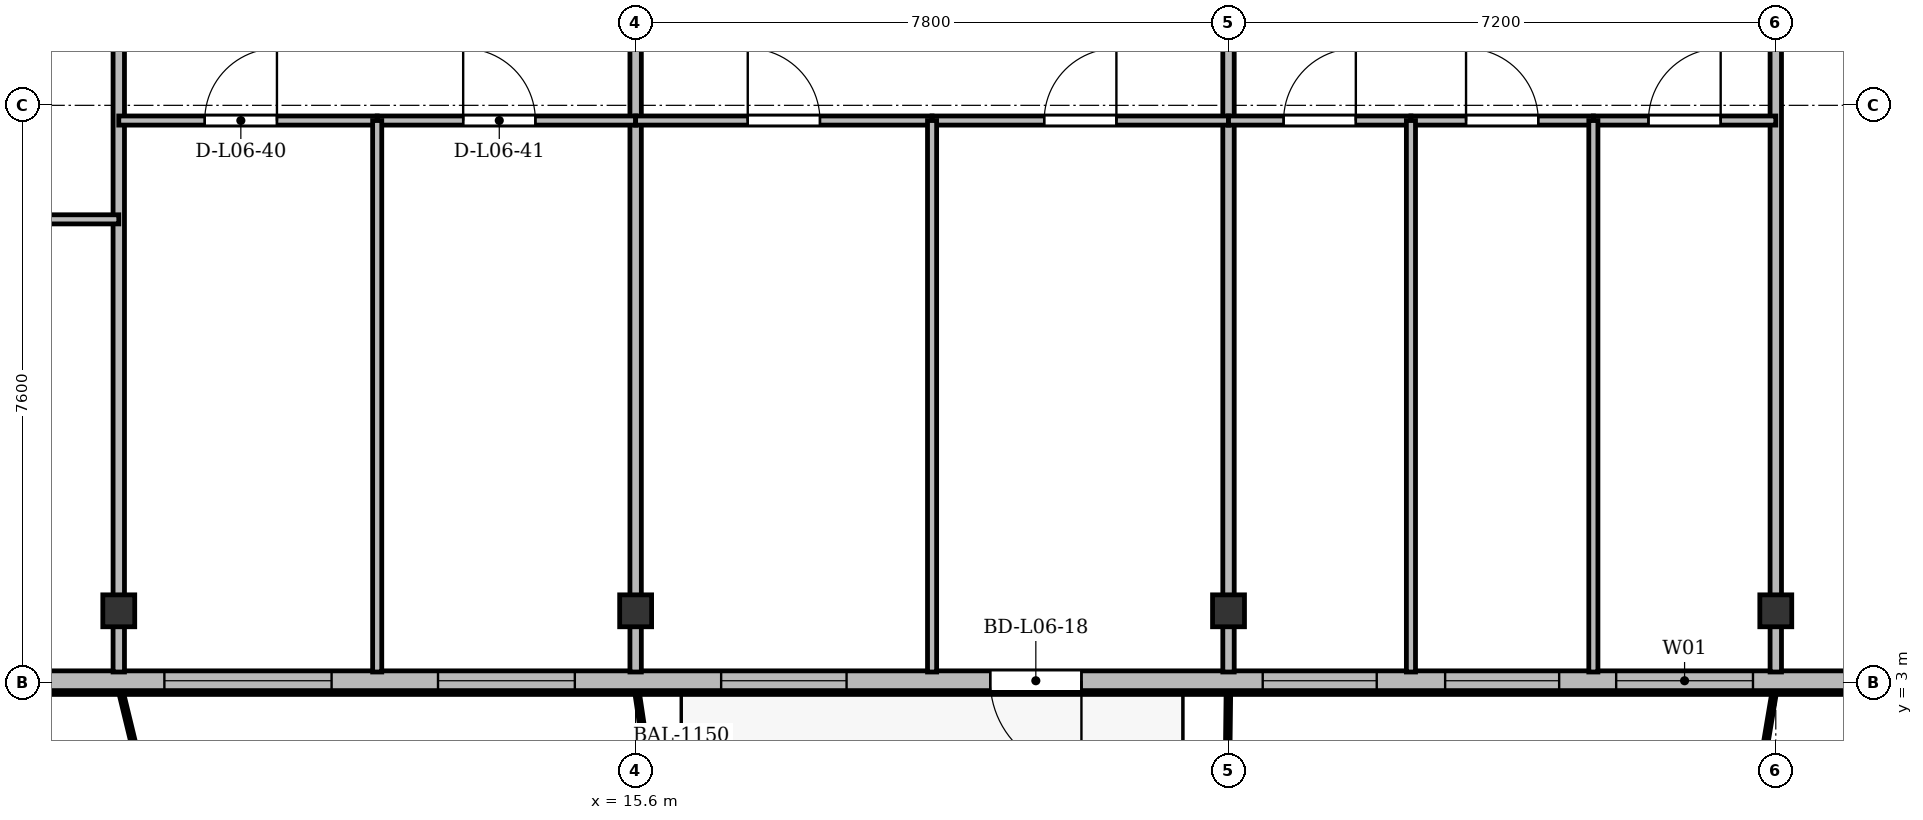
"""IFC4 building model, lengths in metres.
Left out: names, types, materials, properties, quantities, classifications, styles, units other than length and angle.
Written with IfcOpenShell. Run it as: python <this file> out.ifc"""

import sys

from ifc_helpers import new_model, si_unit, direction, frame, frame_2d, origin, origin_2d, place, context, subcontext, project, spatial, rectangle, i_section, extrude, source, transform, mapped, element, fill, save


model = new_model("IFC4")
c1 = context("Model", 3, precision=1e-05, world=origin(), true_north=direction((0.0, 1.0)))
c2 = subcontext(c1, "Body", "Model", "MODEL_VIEW")
j1 = project(units=[si_unit("LENGTHUNIT", "METRE"), si_unit("PLANEANGLEUNIT", "RADIAN")], contexts=[c1])
p1 = place(None, origin())
s1 = spatial("IfcSite", under=j1, at=p1, CompositionType="ELEMENT")
p2 = place(p1, origin())
s2 = spatial("IfcBuilding", under=s1, at=p2, CompositionType="ELEMENT")
p3 = place(p2, frame((0.0, 0.0, 27.1)))
s3 = spatial("IfcBuildingStorey", under=s2, at=p3, CompositionType="ELEMENT", Elevation=27.1)
m1 = source(origin(), c2, "Body", "SweptSolid", [
    extrude(i_section(OverallWidth=0.42, OverallDepth=0.42, WebThickness=0.026, FlangeThickness=0.04, at=origin_2d()), origin(), (0.0, 0.0, 1.0), 3.6),
])
for number, where, z_axis, x_axis in (
    (1, (8.8, 3.95, 0.0), (0.0, 0.0, 1.0), (1.0, 0.0, 0.0)),
    (2, (15.6, 3.95, 0.0), (0.0, 0.0, 1.0), (1.0, 0.0, 0.0)),
    (3, (23.4, 3.95, 0.0), (0.0, 0.0, 1.0), (1.0, 0.0, 0.0)),
    (4, (30.6, 3.95, 0.0), (0.0, 0.0, 1.0), (1.0, 0.0, 0.0)),
):
    element("IfcColumn", number, at=place(p3, frame(where, z_axis=z_axis, x_axis=x_axis)), inside=s3, PredefinedType="COLUMN", context=c2, shape_type="MappedRepresentation", body=[
        mapped(m1, transform((0.0, 0.0, 0.0), x_axis=(1.0, 0.0, 0.0), y_axis=(0.0, 1.0, 0.0), z_axis=(0.0, 0.0, 1.0), scale=1.0)),
    ])
p4 = place(p3, frame((66.9, 3.03, 0.0), z_axis=(0.0, 0.0, 1.0), x_axis=(-1.0, 0.0, 0.0)))
e5 = element("IfcWall", 5, at=p4, inside=s3, PredefinedType="SOLIDWALL", context=c2, shape_type="SweptSolid", body=[
    extrude(rectangle(XDim=59.4, YDim=0.26, at=frame_2d((29.7, 0.0))), origin(), (0.0, 0.0, 1.0), 3.34),
])
p5 = place(p4, frame((3.95, 0.0, 0.9)))
e6 = element("IfcOpeningElement", 6, at=p5, cuts=e5, PredefinedType="OPENING", context=c2, shape_type="SweptSolid", body=[
    extrude(rectangle(XDim=1.5, YDim=1.75, at=frame_2d((0.75, 0.875))), frame((0.0, 0.14, 0.0), z_axis=(0.0, -1.0, 0.0), x_axis=(1.0, 0.0, 0.0)), (0.0, 0.0, 1.0), 0.28),
])
p6 = place(p4, frame((9.05, 0.0, 0.9)))
e7 = element("IfcOpeningElement", 7, at=p6, cuts=e5, PredefinedType="OPENING", context=c2, shape_type="SweptSolid", body=[
    extrude(rectangle(XDim=2.0, YDim=1.95, at=frame_2d((1.0, 0.975))), frame((0.0, 0.14, 0.0), z_axis=(0.0, -1.0, 0.0), x_axis=(1.0, 0.0, 0.0)), (0.0, 0.0, 1.0), 0.28),
])
p7 = place(p4, frame((13.125, 0.0, 0.9)))
e8 = element("IfcOpeningElement", 8, at=p7, cuts=e5, PredefinedType="OPENING", context=c2, shape_type="SweptSolid", body=[
    extrude(rectangle(XDim=1.65, YDim=1.85, at=frame_2d((0.825, 0.925))), frame((0.0, 0.14, 0.0), z_axis=(0.0, -1.0, 0.0), x_axis=(1.0, 0.0, 0.0)), (0.0, 0.0, 1.0), 0.28),
])
p8 = place(p4, frame((17.007, 0.0, 0.0)))
e9 = element("IfcOpeningElement", 9, at=p8, cuts=e5, PredefinedType="OPENING", context=c2, shape_type="SweptSolid", body=[
    extrude(rectangle(XDim=1.2, YDim=2.2, at=frame_2d((0.6, 1.1))), frame((0.0, 0.14, 0.0), z_axis=(0.0, -1.0, 0.0), x_axis=(1.0, 0.0, 0.0)), (0.0, 0.0, 1.0), 0.28),
])
p9 = place(p4, frame((20.2, 0.0, 0.9)))
e10 = element("IfcOpeningElement", 10, at=p9, cuts=e5, PredefinedType="OPENING", context=c2, shape_type="SweptSolid", body=[
    extrude(rectangle(XDim=2.2, YDim=1.8, at=frame_2d((1.1, 0.9))), frame((0.0, 0.14, 0.0), z_axis=(0.0, -1.0, 0.0), x_axis=(1.0, 0.0, 0.0)), (0.0, 0.0, 1.0), 0.28),
])
p10 = place(p4, frame((24.0, 0.0, 0.9)))
e11 = element("IfcOpeningElement", 11, at=p10, cuts=e5, PredefinedType="OPENING", context=c2, shape_type="SweptSolid", body=[
    extrude(rectangle(XDim=1.5, YDim=1.75, at=frame_2d((0.75, 0.875))), frame((0.0, 0.14, 0.0), z_axis=(0.0, -1.0, 0.0), x_axis=(1.0, 0.0, 0.0)), (0.0, 0.0, 1.0), 0.28),
])
p11 = place(p4, frame((27.05, 0.0, 0.9)))
e12 = element("IfcOpeningElement", 12, at=p11, cuts=e5, PredefinedType="OPENING", context=c2, shape_type="SweptSolid", body=[
    extrude(rectangle(XDim=2.0, YDim=1.95, at=frame_2d((1.0, 0.975))), frame((0.0, 0.14, 0.0), z_axis=(0.0, -1.0, 0.0), x_axis=(1.0, 0.0, 0.0)), (0.0, 0.0, 1.0), 0.28),
])
p12 = place(p4, frame((32.175, 0.0, 0.9)))
e13 = element("IfcOpeningElement", 13, at=p12, cuts=e5, PredefinedType="OPENING", context=c2, shape_type="SweptSolid", body=[
    extrude(rectangle(XDim=1.65, YDim=1.85, at=frame_2d((0.825, 0.925))), frame((0.0, 0.14, 0.0), z_axis=(0.0, -1.0, 0.0), x_axis=(1.0, 0.0, 0.0)), (0.0, 0.0, 1.0), 0.28),
])
p13 = place(p4, frame((36.6, 0.0, 0.9)))
e14 = element("IfcOpeningElement", 14, at=p13, cuts=e5, PredefinedType="OPENING", context=c2, shape_type="SweptSolid", body=[
    extrude(rectangle(XDim=1.8, YDim=1.8, at=frame_2d((0.9, 0.9))), frame((0.0, 0.14, 0.0), z_axis=(0.0, -1.0, 0.0), x_axis=(1.0, 0.0, 0.0)), (0.0, 0.0, 1.0), 0.28),
])
p14 = place(p4, frame((39.15, 0.0, 0.9)))
e15 = element("IfcOpeningElement", 15, at=p14, cuts=e5, PredefinedType="OPENING", context=c2, shape_type="SweptSolid", body=[
    extrude(rectangle(XDim=1.5, YDim=1.75, at=frame_2d((0.75, 0.875))), frame((0.0, 0.14, 0.0), z_axis=(0.0, -1.0, 0.0), x_axis=(1.0, 0.0, 0.0)), (0.0, 0.0, 1.0), 0.28),
])
p15 = place(p4, frame((41.55, 0.0, 0.9)))
e16 = element("IfcOpeningElement", 16, at=p15, cuts=e5, PredefinedType="OPENING", context=c2, shape_type="SweptSolid", body=[
    extrude(rectangle(XDim=1.5, YDim=1.75, at=frame_2d((0.75, 0.875))), frame((0.0, 0.14, 0.0), z_axis=(0.0, -1.0, 0.0), x_axis=(1.0, 0.0, 0.0)), (0.0, 0.0, 1.0), 0.28),
])
p16 = place(p4, frame((45.435, 0.0, 0.0)))
e17 = element("IfcOpeningElement", 17, at=p16, cuts=e5, PredefinedType="OPENING", context=c2, shape_type="SweptSolid", body=[
    extrude(rectangle(XDim=1.2, YDim=2.2, at=frame_2d((0.6, 1.1))), frame((0.0, 0.14, 0.0), z_axis=(0.0, -1.0, 0.0), x_axis=(1.0, 0.0, 0.0)), (0.0, 0.0, 1.0), 0.28),
])
p17 = place(p4, frame((48.525, 0.0, 0.9)))
e18 = element("IfcOpeningElement", 18, at=p17, cuts=e5, PredefinedType="OPENING", context=c2, shape_type="SweptSolid", body=[
    extrude(rectangle(XDim=1.65, YDim=1.85, at=frame_2d((0.825, 0.925))), frame((0.0, 0.14, 0.0), z_axis=(0.0, -1.0, 0.0), x_axis=(1.0, 0.0, 0.0)), (0.0, 0.0, 1.0), 0.28),
])
p18 = place(p4, frame((52.1, 0.0, 0.9)))
e19 = element("IfcOpeningElement", 19, at=p18, cuts=e5, PredefinedType="OPENING", context=c2, shape_type="SweptSolid", body=[
    extrude(rectangle(XDim=1.8, YDim=1.8, at=frame_2d((0.9, 0.9))), frame((0.0, 0.14, 0.0), z_axis=(0.0, -1.0, 0.0), x_axis=(1.0, 0.0, 0.0)), (0.0, 0.0, 1.0), 0.28),
])
p19 = place(p4, frame((55.3, 0.0, 0.9)))
e20 = element("IfcOpeningElement", 20, at=p19, cuts=e5, PredefinedType="OPENING", context=c2, shape_type="SweptSolid", body=[
    extrude(rectangle(XDim=2.2, YDim=1.8, at=frame_2d((1.1, 0.9))), frame((0.0, 0.14, 0.0), z_axis=(0.0, -1.0, 0.0), x_axis=(1.0, 0.0, 0.0)), (0.0, 0.0, 1.0), 0.28),
])
for number, where, z_axis, x_axis in (
    (21, (8.8, 3.145, 0.0), (0.0, 0.0, 1.0), (0.0, 1.0, 0.0)),
    (22, (15.6, 3.145, 0.0), (0.0, 0.0, 1.0), (0.0, 1.0, 0.0)),
    (23, (23.4, 3.145, 0.0), (0.0, 0.0, 1.0), (0.0, 1.0, 0.0)),
    (24, (30.6, 3.145, 0.0), (0.0, 0.0, 1.0), (0.0, 1.0, 0.0)),
):
    element("IfcWall", number, at=place(p3, frame(where, z_axis=z_axis, x_axis=x_axis)), inside=s3, PredefinedType="PARTITIONING", context=c2, shape_type="SweptSolid", body=[
        extrude(rectangle(XDim=24.455, YDim=0.15, at=frame_2d((12.228, 0.0))), origin(), (0.0, 0.0, 1.0), 2.752),
    ])
p20 = place(p3, frame((4.76, 9.1, 0.0), z_axis=(0.0, 0.0, 1.0), x_axis=(1.0, 0.0, 0.0)))
e25 = element("IfcWall", 25, at=p20, inside=s3, PredefinedType="PARTITIONING", context=c2, shape_type="SweptSolid", body=[
    extrude(rectangle(XDim=4.04, YDim=0.12, at=frame_2d((2.02, 0.0))), origin(), (0.0, 0.0, 1.0), 2.752),
])
p21 = place(p20, frame((1.545, 0.0, 0.0)))
e26 = element("IfcOpeningElement", 26, at=p21, cuts=e25, PredefinedType="OPENING", context=c2, shape_type="SweptSolid", body=[
    extrude(rectangle(XDim=0.95, YDim=2.15, at=frame_2d((0.475, 1.075))), frame((0.0, 0.07, 0.0), z_axis=(0.0, -1.0, 0.0), x_axis=(1.0, 0.0, 0.0)), (0.0, 0.0, 1.0), 0.14),
])
p22 = place(p3, frame((8.8, 10.4, 0.0), z_axis=(0.0, 0.0, 1.0), x_axis=(1.0, 0.0, 0.0)))
e27 = element("IfcWall", 27, at=p22, inside=s3, PredefinedType="PARTITIONING", context=c2, shape_type="SweptSolid", body=[
    extrude(rectangle(XDim=3.4, YDim=0.12, at=frame_2d((1.7, 0.0))), origin(), (0.0, 0.0, 1.0), 2.752),
])
p23 = place(p22, frame((1.131, 0.0, 0.0)))
e28 = element("IfcOpeningElement", 28, at=p23, cuts=e27, PredefinedType="OPENING", context=c2, shape_type="SweptSolid", body=[
    extrude(rectangle(XDim=0.95, YDim=2.15, at=frame_2d((0.475, 1.075))), frame((0.0, 0.07, 0.0), z_axis=(0.0, -1.0, 0.0), x_axis=(1.0, 0.0, 0.0)), (0.0, 0.0, 1.0), 0.14),
])
p24 = place(p3, frame((12.2, 10.4, 0.0), z_axis=(0.0, 0.0, 1.0), x_axis=(1.0, 0.0, 0.0)))
e29 = element("IfcWall", 29, at=p24, inside=s3, PredefinedType="PARTITIONING", context=c2, shape_type="SweptSolid", body=[
    extrude(rectangle(XDim=3.4, YDim=0.12, at=frame_2d((1.7, 0.0))), origin(), (0.0, 0.0, 1.0), 2.752),
])
p25 = place(p24, frame((1.131, 0.0, 0.0)))
e30 = element("IfcOpeningElement", 30, at=p25, cuts=e29, PredefinedType="OPENING", context=c2, shape_type="SweptSolid", body=[
    extrude(rectangle(XDim=0.95, YDim=2.15, at=frame_2d((0.475, 1.075))), frame((0.0, 0.07, 0.0), z_axis=(0.0, -1.0, 0.0), x_axis=(1.0, 0.0, 0.0)), (0.0, 0.0, 1.0), 0.14),
])
p26 = place(p3, frame((12.2, 3.145, 0.0), z_axis=(0.0, 0.0, 1.0), x_axis=(0.0, 1.0, 0.0)))
e31 = element("IfcWall", 31, at=p26, inside=s3, PredefinedType="PARTITIONING", context=c2, shape_type="SweptSolid", body=[
    extrude(rectangle(XDim=7.255, YDim=0.12, at=frame_2d((3.627, 0.0))), origin(), (0.0, 0.0, 1.0), 2.69),
])
p27 = place(p3, frame((15.6, 10.4, 0.0), z_axis=(0.0, 0.0, 1.0), x_axis=(1.0, 0.0, 0.0)))
e32 = element("IfcWall", 32, at=p27, inside=s3, PredefinedType="PARTITIONING", context=c2, shape_type="SweptSolid", body=[
    extrude(rectangle(XDim=3.9, YDim=0.12, at=frame_2d((1.95, 0.0))), origin(), (0.0, 0.0, 1.0), 2.752),
])
p28 = place(p27, frame((1.475, 0.0, 0.0)))
e33 = element("IfcOpeningElement", 33, at=p28, cuts=e32, PredefinedType="OPENING", context=c2, shape_type="SweptSolid", body=[
    extrude(rectangle(XDim=0.95, YDim=2.15, at=frame_2d((0.475, 1.075))), frame((0.0, 0.07, 0.0), z_axis=(0.0, -1.0, 0.0), x_axis=(1.0, 0.0, 0.0)), (0.0, 0.0, 1.0), 0.14),
])
p29 = place(p3, frame((19.5, 10.4, 0.0), z_axis=(0.0, 0.0, 1.0), x_axis=(1.0, 0.0, 0.0)))
e34 = element("IfcWall", 34, at=p29, inside=s3, PredefinedType="PARTITIONING", context=c2, shape_type="SweptSolid", body=[
    extrude(rectangle(XDim=3.9, YDim=0.12, at=frame_2d((1.95, 0.0))), origin(), (0.0, 0.0, 1.0), 2.752),
])
p30 = place(p29, frame((1.475, 0.0, 0.0)))
e35 = element("IfcOpeningElement", 35, at=p30, cuts=e34, PredefinedType="OPENING", context=c2, shape_type="SweptSolid", body=[
    extrude(rectangle(XDim=0.95, YDim=2.15, at=frame_2d((0.475, 1.075))), frame((0.0, 0.07, 0.0), z_axis=(0.0, -1.0, 0.0), x_axis=(1.0, 0.0, 0.0)), (0.0, 0.0, 1.0), 0.14),
])
p31 = place(p3, frame((19.5, 3.145, 0.0), z_axis=(0.0, 0.0, 1.0), x_axis=(0.0, 1.0, 0.0)))
e36 = element("IfcWall", 36, at=p31, inside=s3, PredefinedType="PARTITIONING", context=c2, shape_type="SweptSolid", body=[
    extrude(rectangle(XDim=7.255, YDim=0.12, at=frame_2d((3.627, 0.0))), origin(), (0.0, 0.0, 1.0), 2.69),
])
p32 = place(p3, frame((23.4, 10.4, 0.0), z_axis=(0.0, 0.0, 1.0), x_axis=(1.0, 0.0, 0.0)))
e37 = element("IfcWall", 37, at=p32, inside=s3, PredefinedType="PARTITIONING", context=c2, shape_type="SweptSolid", body=[
    extrude(rectangle(XDim=2.4, YDim=0.12, at=frame_2d((1.2, 0.0))), origin(), (0.0, 0.0, 1.0), 2.752),
])
p33 = place(p32, frame((0.725, 0.0, 0.0)))
e38 = element("IfcOpeningElement", 38, at=p33, cuts=e37, PredefinedType="OPENING", context=c2, shape_type="SweptSolid", body=[
    extrude(rectangle(XDim=0.95, YDim=2.15, at=frame_2d((0.475, 1.075))), frame((0.0, 0.07, 0.0), z_axis=(0.0, -1.0, 0.0), x_axis=(1.0, 0.0, 0.0)), (0.0, 0.0, 1.0), 0.14),
])
p34 = place(p3, frame((25.8, 10.4, 0.0), z_axis=(0.0, 0.0, 1.0), x_axis=(1.0, 0.0, 0.0)))
e39 = element("IfcWall", 39, at=p34, inside=s3, PredefinedType="PARTITIONING", context=c2, shape_type="SweptSolid", body=[
    extrude(rectangle(XDim=2.4, YDim=0.12, at=frame_2d((1.2, 0.0))), origin(), (0.0, 0.0, 1.0), 3.34),
])
p35 = place(p34, frame((0.725, 0.0, 0.0)))
e40 = element("IfcOpeningElement", 40, at=p35, cuts=e39, PredefinedType="OPENING", context=c2, shape_type="SweptSolid", body=[
    extrude(rectangle(XDim=0.95, YDim=2.15, at=frame_2d((0.475, 1.075))), frame((0.0, 0.07, 0.0), z_axis=(0.0, -1.0, 0.0), x_axis=(1.0, 0.0, 0.0)), (0.0, 0.0, 1.0), 0.14),
])
p36 = place(p3, frame((25.8, 3.145, 0.0), z_axis=(0.0, 0.0, 1.0), x_axis=(0.0, 1.0, 0.0)))
e41 = element("IfcWall", 41, at=p36, inside=s3, PredefinedType="PARTITIONING", context=c2, shape_type="SweptSolid", body=[
    extrude(rectangle(XDim=7.255, YDim=0.12, at=frame_2d((3.627, 0.0))), origin(), (0.0, 0.0, 1.0), 2.69),
])
p37 = place(p3, frame((28.2, 10.4, 0.0), z_axis=(0.0, 0.0, 1.0), x_axis=(1.0, 0.0, 0.0)))
e42 = element("IfcWall", 42, at=p37, inside=s3, PredefinedType="PARTITIONING", context=c2, shape_type="SweptSolid", body=[
    extrude(rectangle(XDim=2.4, YDim=0.12, at=frame_2d((1.2, 0.0))), origin(), (0.0, 0.0, 1.0), 2.752),
])
p38 = place(p37, frame((0.725, 0.0, 0.0)))
e43 = element("IfcOpeningElement", 43, at=p38, cuts=e42, PredefinedType="OPENING", context=c2, shape_type="SweptSolid", body=[
    extrude(rectangle(XDim=0.95, YDim=2.15, at=frame_2d((0.475, 1.075))), frame((0.0, 0.07, 0.0), z_axis=(0.0, -1.0, 0.0), x_axis=(1.0, 0.0, 0.0)), (0.0, 0.0, 1.0), 0.14),
])
p39 = place(p3, frame((28.2, 3.145, 0.0), z_axis=(0.0, 0.0, 1.0), x_axis=(0.0, 1.0, 0.0)))
e44 = element("IfcWall", 44, at=p39, inside=s3, PredefinedType="PARTITIONING", context=c2, shape_type="SweptSolid", body=[
    extrude(rectangle(XDim=7.255, YDim=0.12, at=frame_2d((3.627, 0.0))), origin(), (0.0, 0.0, 1.0), 2.69),
])
m2 = source(origin(), c2, "Body", "SweptSolid", [
    extrude(rectangle(XDim=1.8, YDim=1.8, at=frame_2d((0.9, 0.9))), frame((0.0, 0.03, 0.0), z_axis=(0.0, -1.0, 0.0), x_axis=(1.0, 0.0, 0.0)), (0.0, 0.0, 1.0), 0.06),
])
p40 = place(p13, origin())
e45 = element("IfcWindow", 45, at=p40, inside=s3, PartitioningType="SINGLE_PANEL", PredefinedType="WINDOW", context=c2, shape_type="MappedRepresentation", body=[
    mapped(m2, transform((0.0, 0.0, 0.0), x_axis=(1.0, 0.0, 0.0), y_axis=(0.0, 1.0, 0.0), z_axis=(0.0, 0.0, 1.0), scale=1.0)),
])
fill(e14, e45)
m3 = source(origin(), c2, "Body", "SweptSolid", [
    extrude(rectangle(XDim=1.5, YDim=1.75, at=frame_2d((0.75, 0.875))), frame((0.0, 0.03, 0.0), z_axis=(0.0, -1.0, 0.0), x_axis=(1.0, 0.0, 0.0)), (0.0, 0.0, 1.0), 0.06),
])
p41 = place(p14, origin())
e46 = element("IfcWindow", 46, at=p41, inside=s3, PartitioningType="SINGLE_PANEL", PredefinedType="WINDOW", context=c2, shape_type="MappedRepresentation", body=[
    mapped(m3, transform((0.0, 0.0, 0.0), x_axis=(1.0, 0.0, 0.0), y_axis=(0.0, 1.0, 0.0), z_axis=(0.0, 0.0, 1.0), scale=1.0)),
])
fill(e15, e46)
p42 = place(p15, origin())
e47 = element("IfcWindow", 47, at=p42, inside=s3, PartitioningType="SINGLE_PANEL", PredefinedType="WINDOW", context=c2, shape_type="MappedRepresentation", body=[
    mapped(m3, transform((0.0, 0.0, 0.0), x_axis=(1.0, 0.0, 0.0), y_axis=(0.0, 1.0, 0.0), z_axis=(0.0, 0.0, 1.0), scale=1.0)),
])
fill(e16, e47)
m4 = source(origin(), c2, "Body", "SweptSolid", [
    extrude(rectangle(XDim=1.2, YDim=2.2, at=frame_2d((0.6, 1.1))), frame((0.0, 0.025, 0.0), z_axis=(0.0, -1.0, 0.0), x_axis=(1.0, 0.0, 0.0)), (0.0, 0.0, 1.0), 0.05),
])
p43 = place(p16, origin())
e48 = element("IfcDoor", 48, at=p43, inside=s3, OperationType="SINGLE_SWING_LEFT", PredefinedType="DOOR", context=c2, shape_type="MappedRepresentation", body=[
    mapped(m4, transform((0.0, 0.0, 0.0), x_axis=(1.0, 0.0, 0.0), y_axis=(0.0, 1.0, 0.0), z_axis=(0.0, 0.0, 1.0), scale=1.0)),
])
fill(e17, e48)
m5 = source(origin(), c2, "Body", "SweptSolid", [
    extrude(rectangle(XDim=1.65, YDim=1.85, at=frame_2d((0.825, 0.925))), frame((0.0, 0.03, 0.0), z_axis=(0.0, -1.0, 0.0), x_axis=(1.0, 0.0, 0.0)), (0.0, 0.0, 1.0), 0.06),
])
p44 = place(p17, origin())
e49 = element("IfcWindow", 49, at=p44, inside=s3, PartitioningType="SINGLE_PANEL", PredefinedType="WINDOW", context=c2, shape_type="MappedRepresentation", body=[
    mapped(m5, transform((0.0, 0.0, 0.0), x_axis=(1.0, 0.0, 0.0), y_axis=(0.0, 1.0, 0.0), z_axis=(0.0, 0.0, 1.0), scale=1.0)),
])
fill(e18, e49)
p45 = place(p18, origin())
e50 = element("IfcWindow", 50, at=p45, inside=s3, PartitioningType="SINGLE_PANEL", PredefinedType="WINDOW", context=c2, shape_type="MappedRepresentation", body=[
    mapped(m2, transform((0.0, 0.0, 0.0), x_axis=(1.0, 0.0, 0.0), y_axis=(0.0, 1.0, 0.0), z_axis=(0.0, 0.0, 1.0), scale=1.0)),
])
fill(e19, e50)
m6 = source(origin(), c2, "Body", "SweptSolid", [
    extrude(rectangle(XDim=2.2, YDim=1.8, at=frame_2d((1.1, 0.9))), frame((0.0, 0.03, 0.0), z_axis=(0.0, -1.0, 0.0), x_axis=(1.0, 0.0, 0.0)), (0.0, 0.0, 1.0), 0.06),
])
p46 = place(p19, origin())
e51 = element("IfcWindow", 51, at=p46, inside=s3, PartitioningType="SINGLE_PANEL", PredefinedType="WINDOW", context=c2, shape_type="MappedRepresentation", body=[
    mapped(m6, transform((0.0, 0.0, 0.0), x_axis=(1.0, 0.0, 0.0), y_axis=(0.0, 1.0, 0.0), z_axis=(0.0, 0.0, 1.0), scale=1.0)),
])
fill(e20, e51)
m7 = source(origin(), c2, "Body", "SweptSolid", [
    extrude(rectangle(XDim=0.95, YDim=2.15, at=frame_2d((0.475, 1.075))), frame((0.0, 0.025, 0.0), z_axis=(0.0, -1.0, 0.0), x_axis=(1.0, 0.0, 0.0)), (0.0, 0.0, 1.0), 0.05),
])
p47 = place(p23, origin())
e52 = element("IfcDoor", 52, at=p47, inside=s3, OperationType="SINGLE_SWING_RIGHT", PredefinedType="DOOR", context=c2, shape_type="MappedRepresentation", body=[
    mapped(m7, transform((0.0, 0.0, 0.0), x_axis=(1.0, 0.0, 0.0), y_axis=(0.0, 1.0, 0.0), z_axis=(0.0, 0.0, 1.0), scale=1.0)),
])
fill(e28, e52)
p48 = place(p25, origin())
e53 = element("IfcDoor", 53, at=p48, inside=s3, OperationType="SINGLE_SWING_LEFT", PredefinedType="DOOR", context=c2, shape_type="MappedRepresentation", body=[
    mapped(m7, transform((0.0, 0.0, 0.0), x_axis=(1.0, 0.0, 0.0), y_axis=(0.0, 1.0, 0.0), z_axis=(0.0, 0.0, 1.0), scale=1.0)),
])
fill(e30, e53)
p49 = place(p28, origin())
e54 = element("IfcDoor", 54, at=p49, inside=s3, OperationType="SINGLE_SWING_LEFT", PredefinedType="DOOR", context=c2, shape_type="MappedRepresentation", body=[
    mapped(m7, transform((0.0, 0.0, 0.0), x_axis=(1.0, 0.0, 0.0), y_axis=(0.0, 1.0, 0.0), z_axis=(0.0, 0.0, 1.0), scale=1.0)),
])
fill(e33, e54)
p50 = place(p30, origin())
e55 = element("IfcDoor", 55, at=p50, inside=s3, OperationType="SINGLE_SWING_RIGHT", PredefinedType="DOOR", context=c2, shape_type="MappedRepresentation", body=[
    mapped(m7, transform((0.0, 0.0, 0.0), x_axis=(1.0, 0.0, 0.0), y_axis=(0.0, 1.0, 0.0), z_axis=(0.0, 0.0, 1.0), scale=1.0)),
])
fill(e35, e55)
p51 = place(p33, origin())
e56 = element("IfcDoor", 56, at=p51, inside=s3, OperationType="SINGLE_SWING_RIGHT", PredefinedType="DOOR", context=c2, shape_type="MappedRepresentation", body=[
    mapped(m7, transform((0.0, 0.0, 0.0), x_axis=(1.0, 0.0, 0.0), y_axis=(0.0, 1.0, 0.0), z_axis=(0.0, 0.0, 1.0), scale=1.0)),
])
fill(e38, e56)
p52 = place(p35, origin())
e57 = element("IfcDoor", 57, at=p52, inside=s3, OperationType="SINGLE_SWING_LEFT", PredefinedType="DOOR", context=c2, shape_type="MappedRepresentation", body=[
    mapped(m7, transform((0.0, 0.0, 0.0), x_axis=(1.0, 0.0, 0.0), y_axis=(0.0, 1.0, 0.0), z_axis=(0.0, 0.0, 1.0), scale=1.0)),
])
fill(e40, e57)
p53 = place(p38, origin())
e58 = element("IfcDoor", 58, at=p53, inside=s3, OperationType="SINGLE_SWING_RIGHT", PredefinedType="DOOR", context=c2, shape_type="MappedRepresentation", body=[
    mapped(m7, transform((0.0, 0.0, 0.0), x_axis=(1.0, 0.0, 0.0), y_axis=(0.0, 1.0, 0.0), z_axis=(0.0, 0.0, 1.0), scale=1.0)),
])
fill(e43, e58)
save(model, sys.argv[1])
